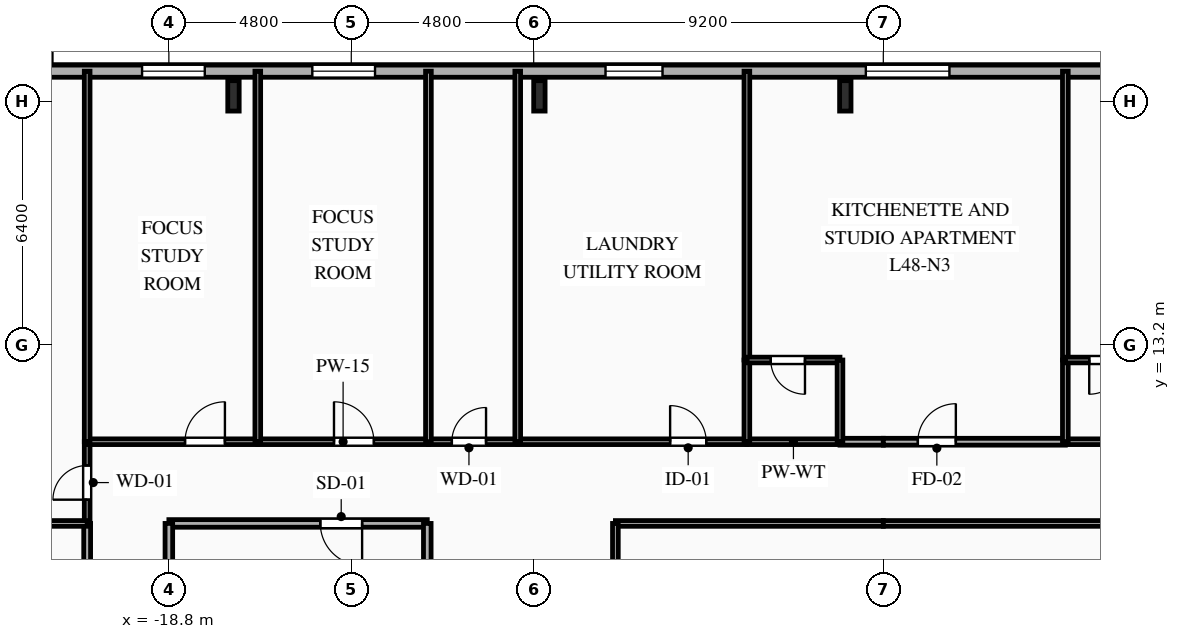
"""IFC4 building model, lengths in metres.
Left out: names, types, materials, properties, quantities, classifications, styles, units other than length and angle.
Written with IfcOpenShell. Run it as: python <this file> out.ifc"""

import sys

from ifc_helpers import new_model, si_unit, direction, frame, frame_2d, origin, origin_2d, place, context, subcontext, project, spatial, rectangle, i_section, extrude, element, fill, save


model = new_model("IFC4")
c1 = context("Model", 3, precision=1e-05, world=origin(), true_north=direction((0.0, 1.0)))
c2 = subcontext(c1, "Body", "Model", "MODEL_VIEW")
j1 = project(units=[si_unit("LENGTHUNIT", "METRE"), si_unit("PLANEANGLEUNIT", "RADIAN")], contexts=[c1])
p1 = place(None, origin())
s1 = spatial("IfcSite", under=j1, at=p1, CompositionType="ELEMENT")
p2 = place(p1, origin())
s2 = spatial("IfcBuilding", under=s1, at=p2, CompositionType="ELEMENT")
p3 = place(p2, frame((0.0, 0.0, 171.2)))
s3 = spatial("IfcBuildingStorey", under=s2, at=p3, CompositionType="ELEMENT", Elevation=171.2)
for number, where, z_axis, x_axis in (
    (1, (-1.0, 19.75, 0.0), (0.0, 0.0, 1.0), (1.0, 0.0, 0.0)),
    (2, (-9.05, 19.75, 0.0), (0.0, 0.0, 1.0), (1.0, 0.0, 0.0)),
    (3, (-17.1, 19.75, 0.0), (0.0, 0.0, 1.0), (1.0, 0.0, 0.0)),
):
    element("IfcColumn", number, at=place(p3, frame(where, z_axis=z_axis, x_axis=x_axis)), inside=s3, PredefinedType="COLUMN", context=c2, shape_type="SweptSolid", body=[
        extrude(i_section(OverallWidth=0.3, OverallDepth=0.8, WebThickness=0.018, FlangeThickness=0.033, FilletRadius=0.03, at=origin_2d()), origin(), (0.0, 0.0, 1.0), 3.35),
    ])
p4 = place(p3, frame((-25.8, 20.4, 0.0), z_axis=(0.0, 0.0, 1.0), x_axis=(1.0, 0.0, 0.0)))
e4 = element("IfcWall", 4, at=p4, inside=s3, PredefinedType="SOLIDWALL", context=c2, shape_type="SweptSolid", body=[
    extrude(rectangle(XDim=49.6, YDim=0.32, at=frame_2d((24.8, 0.0))), origin(), (0.0, 0.0, 1.0), 3.0),
])
p5 = place(p4, frame((2.135, 0.0, 0.85)))
e5 = element("IfcOpeningElement", 5, at=p5, cuts=e4, PredefinedType="OPENING", context=c2, shape_type="SweptSolid", body=[
    extrude(rectangle(XDim=1.65, YDim=1.85, at=frame_2d((0.825, 0.925))), frame((0.0, 0.17, 0.0), z_axis=(0.0, -1.0, 0.0), x_axis=(1.0, 0.0, 0.0)), (0.0, 0.0, 1.0), 0.34),
])
p6 = place(p4, frame((6.295, 0.0, 0.85)))
e6 = element("IfcOpeningElement", 6, at=p6, cuts=e4, PredefinedType="OPENING", context=c2, shape_type="SweptSolid", body=[
    extrude(rectangle(XDim=1.65, YDim=1.85, at=frame_2d((0.825, 0.925))), frame((0.0, 0.17, 0.0), z_axis=(0.0, -1.0, 0.0), x_axis=(1.0, 0.0, 0.0)), (0.0, 0.0, 1.0), 0.34),
])
p7 = place(p4, frame((10.775, 0.0, 0.85)))
e7 = element("IfcOpeningElement", 7, at=p7, cuts=e4, PredefinedType="OPENING", context=c2, shape_type="SweptSolid", body=[
    extrude(rectangle(XDim=1.65, YDim=1.85, at=frame_2d((0.825, 0.925))), frame((0.0, 0.17, 0.0), z_axis=(0.0, -1.0, 0.0), x_axis=(1.0, 0.0, 0.0)), (0.0, 0.0, 1.0), 0.34),
])
p8 = place(p4, frame((18.49, 0.0, 0.85)))
e8 = element("IfcOpeningElement", 8, at=p8, cuts=e4, PredefinedType="OPENING", context=c2, shape_type="SweptSolid", body=[
    extrude(rectangle(XDim=1.5, YDim=1.85, at=frame_2d((0.75, 0.925))), frame((0.0, 0.17, 0.0), z_axis=(0.0, -1.0, 0.0), x_axis=(1.0, 0.0, 0.0)), (0.0, 0.0, 1.0), 0.34),
])
p9 = place(p4, frame((25.34, 0.0, 0.85)))
e9 = element("IfcOpeningElement", 9, at=p9, cuts=e4, PredefinedType="OPENING", context=c2, shape_type="SweptSolid", body=[
    extrude(rectangle(XDim=2.2, YDim=1.85, at=frame_2d((1.1, 0.925))), frame((0.0, 0.17, 0.0), z_axis=(0.0, -1.0, 0.0), x_axis=(1.0, 0.0, 0.0)), (0.0, 0.0, 1.0), 0.34),
])
p10 = place(p4, frame((33.74, 0.0, 0.85)))
e10 = element("IfcOpeningElement", 10, at=p10, cuts=e4, PredefinedType="OPENING", context=c2, shape_type="SweptSolid", body=[
    extrude(rectangle(XDim=2.2, YDim=1.85, at=frame_2d((1.1, 0.925))), frame((0.0, 0.17, 0.0), z_axis=(0.0, -1.0, 0.0), x_axis=(1.0, 0.0, 0.0)), (0.0, 0.0, 1.0), 0.34),
])
p11 = place(p4, frame((42.095, 0.0, 0.85)))
e11 = element("IfcOpeningElement", 11, at=p11, cuts=e4, PredefinedType="OPENING", context=c2, shape_type="SweptSolid", body=[
    extrude(rectangle(XDim=1.65, YDim=1.85, at=frame_2d((0.825, 0.925))), frame((0.0, 0.17, 0.0), z_axis=(0.0, -1.0, 0.0), x_axis=(1.0, 0.0, 0.0)), (0.0, 0.0, 1.0), 0.34),
])
p12 = place(p4, frame((47.45, 0.0, 0.85)))
e12 = element("IfcOpeningElement", 12, at=p12, cuts=e4, PredefinedType="OPENING", context=c2, shape_type="SweptSolid", body=[
    extrude(rectangle(XDim=1.1, YDim=1.85, at=frame_2d((0.55, 0.925))), frame((0.0, 0.17, 0.0), z_axis=(0.0, -1.0, 0.0), x_axis=(1.0, 0.0, 0.0)), (0.0, 0.0, 1.0), 0.34),
])
p13 = place(p3, frame((-12.0, 8.5, 0.0), z_axis=(0.0, 0.0, 1.0), x_axis=(-1.0, 0.0, 0.0)))
e13 = element("IfcWall", 13, at=p13, inside=s3, PredefinedType="PARTITIONING", context=c2, shape_type="SweptSolid", body=[
    extrude(rectangle(XDim=6.8, YDim=0.2, at=frame_2d((3.4, 0.0))), origin(), (0.0, 0.0, 1.0), 3.0),
])
p14 = place(p13, frame((1.715, 0.0, 0.0)))
e14 = element("IfcOpeningElement", 14, at=p14, cuts=e13, PredefinedType="OPENING", context=c2, shape_type="SweptSolid", body=[
    extrude(rectangle(XDim=1.1, YDim=2.15, at=frame_2d((0.55, 1.075))), frame((0.0, 0.11, 0.0), z_axis=(0.0, -1.0, 0.0), x_axis=(1.0, 0.0, 0.0)), (0.0, 0.0, 1.0), 0.22),
])
p15 = place(p3, frame((-18.8, 8.5, 0.0), z_axis=(0.0, 0.0, 1.0), x_axis=(0.0, -1.0, 0.0)))
e15 = element("IfcWall", 15, at=p15, inside=s3, PredefinedType="PARTITIONING", context=c2, shape_type="SweptSolid", body=[
    extrude(rectangle(XDim=2.9, YDim=0.2, at=frame_2d((1.45, 0.0))), origin(), (0.0, 0.0, 1.0), 2.485),
])
p16 = place(p3, frame((-12.0, 5.6, 0.0), z_axis=(0.0, 0.0, 1.0), x_axis=(0.0, 1.0, 0.0)))
e16 = element("IfcWall", 16, at=p16, inside=s3, PredefinedType="PARTITIONING", context=c2, shape_type="SweptSolid", body=[
    extrude(rectangle(XDim=2.9, YDim=0.2, at=frame_2d((1.45, 0.0))), origin(), (0.0, 0.0, 1.0), 3.0),
])
p17 = place(p3, frame((-20.95, 8.5, 0.0), z_axis=(0.0, 0.0, 1.0), x_axis=(0.0, 1.0, 0.0)))
e17 = element("IfcWall", 17, at=p17, inside=s3, PredefinedType="PARTITIONING", context=c2, shape_type="SweptSolid", body=[
    extrude(rectangle(XDim=2.15, YDim=0.15, at=frame_2d((1.075, 0.0))), origin(), (0.0, 0.0, 1.0), 3.0),
])
p18 = place(p17, frame((0.625, 0.0, 0.0)))
e18 = element("IfcOpeningElement", 18, at=p18, cuts=e17, PredefinedType="OPENING", context=c2, shape_type="SweptSolid", body=[
    extrude(rectangle(XDim=0.9, YDim=2.1, at=frame_2d((0.45, 1.05))), frame((0.0, 0.085, 0.0), z_axis=(0.0, -1.0, 0.0), x_axis=(1.0, 0.0, 0.0)), (0.0, 0.0, 1.0), 0.17),
])
p19 = place(p3, frame((-20.95, 10.65, 0.0), z_axis=(0.0, 0.0, 1.0), x_axis=(1.0, 0.0, 0.0)))
e19 = element("IfcWall", 19, at=p19, inside=s3, PredefinedType="PARTITIONING", context=c2, shape_type="SweptSolid", body=[
    extrude(rectangle(XDim=4.49, YDim=0.15, at=frame_2d((2.245, 0.0))), origin(), (0.0, 0.0, 1.0), 3.0),
])
p20 = place(p19, frame((2.575, 0.0, 0.0)))
e20 = element("IfcOpeningElement", 20, at=p20, cuts=e19, PredefinedType="OPENING", context=c2, shape_type="SweptSolid", body=[
    extrude(rectangle(XDim=1.05, YDim=2.15, at=frame_2d((0.525, 1.075))), frame((0.0, 0.085, 0.0), z_axis=(0.0, -1.0, 0.0), x_axis=(1.0, 0.0, 0.0)), (0.0, 0.0, 1.0), 0.17),
])
p21 = place(p3, frame((-16.46, 10.65, 0.0), z_axis=(0.0, 0.0, 1.0), x_axis=(1.0, 0.0, 0.0)))
e21 = element("IfcWall", 21, at=p21, inside=s3, PredefinedType="PARTITIONING", context=c2, shape_type="SweptSolid", body=[
    extrude(rectangle(XDim=4.49, YDim=0.15, at=frame_2d((2.245, 0.0))), origin(), (0.0, 0.0, 1.0), 3.0),
])
p22 = place(p21, frame((2.005, 0.0, 0.0)))
e22 = element("IfcOpeningElement", 22, at=p22, cuts=e21, PredefinedType="OPENING", context=c2, shape_type="SweptSolid", body=[
    extrude(rectangle(XDim=1.05, YDim=2.15, at=frame_2d((0.525, 1.075))), frame((0.0, 0.085, 0.0), z_axis=(0.0, -1.0, 0.0), x_axis=(1.0, 0.0, 0.0)), (0.0, 0.0, 1.0), 0.17),
])
p23 = place(p3, frame((-11.97, 10.65, 0.0), z_axis=(0.0, 0.0, 1.0), x_axis=(1.0, 0.0, 0.0)))
e23 = element("IfcWall", 23, at=p23, inside=s3, PredefinedType="PLUMBINGWALL", context=c2, shape_type="SweptSolid", body=[
    extrude(rectangle(XDim=2.35, YDim=0.15, at=frame_2d((1.175, 0.0))), origin(), (0.0, 0.0, 1.0), 3.0),
])
p24 = place(p23, frame((0.616, 0.0, 0.0)))
e24 = element("IfcOpeningElement", 24, at=p24, cuts=e23, PredefinedType="OPENING", context=c2, shape_type="SweptSolid", body=[
    extrude(rectangle(XDim=0.9, YDim=2.1, at=frame_2d((0.45, 1.05))), frame((0.0, 0.085, 0.0), z_axis=(0.0, -1.0, 0.0), x_axis=(1.0, 0.0, 0.0)), (0.0, 0.0, 1.0), 0.17),
])
p25 = place(p3, frame((-9.62, 10.65, 0.0), z_axis=(0.0, 0.0, 1.0), x_axis=(1.0, 0.0, 0.0)))
e25 = element("IfcWall", 25, at=p25, inside=s3, PredefinedType="PARTITIONING", context=c2, shape_type="SweptSolid", body=[
    extrude(rectangle(XDim=6.03, YDim=0.15, at=frame_2d((3.015, 0.0))), origin(), (0.0, 0.0, 1.0), 3.0),
])
p26 = place(p25, frame((4.01, 0.0, 0.0)))
e26 = element("IfcOpeningElement", 26, at=p26, cuts=e25, PredefinedType="OPENING", context=c2, shape_type="SweptSolid", body=[
    extrude(rectangle(XDim=0.95, YDim=2.1, at=frame_2d((0.475, 1.05))), frame((0.0, 0.085, 0.0), z_axis=(0.0, -1.0, 0.0), x_axis=(1.0, 0.0, 0.0)), (0.0, 0.0, 1.0), 0.17),
])
p27 = place(p3, frame((-1.14, 10.65, 0.0), z_axis=(0.0, 0.0, 1.0), x_axis=(1.0, 0.0, 0.0)))
e27 = element("IfcWall", 27, at=p27, inside=s3, PredefinedType="PARTITIONING", context=c2, shape_type="SweptSolid", body=[
    extrude(rectangle(XDim=1.14, YDim=0.18, at=frame_2d((0.57, 0.0))), origin(), (0.0, 0.0, 1.0), 3.0),
])
p28 = place(p3, frame((-3.59, 10.65, 0.0), z_axis=(0.0, 0.0, 1.0), x_axis=(1.0, 0.0, 0.0)))
e28 = element("IfcWall", 28, at=p28, inside=s3, PredefinedType="PLUMBINGWALL", context=c2, shape_type="SweptSolid", body=[
    extrude(rectangle(XDim=2.45, YDim=0.15, at=frame_2d((1.225, 0.0))), origin(), (0.0, 0.0, 1.0), 3.0),
])
p29 = place(p3, frame((0.0, 8.5, 0.0), z_axis=(0.0, 0.0, 1.0), x_axis=(-1.0, 0.0, 0.0)))
e29 = element("IfcWall", 29, at=p29, inside=s3, PredefinedType="PARTITIONING", context=c2, shape_type="SweptSolid", body=[
    extrude(rectangle(XDim=7.05, YDim=0.15, at=frame_2d((3.525, 0.0))), origin(), (0.0, 0.0, 1.0), 3.0),
])
p30 = place(p3, frame((0.0, 10.65, 0.0), z_axis=(0.0, 0.0, 1.0), x_axis=(1.0, 0.0, 0.0)))
e30 = element("IfcWall", 30, at=p30, inside=s3, PredefinedType="PARTITIONING", context=c2, shape_type="SweptSolid", body=[
    extrude(rectangle(XDim=4.79, YDim=0.18, at=frame_2d((2.395, 0.0))), origin(), (0.0, 0.0, 1.0), 3.0),
])
p31 = place(p30, frame((0.909, 0.0, 0.0)))
e31 = element("IfcOpeningElement", 31, at=p31, cuts=e30, PredefinedType="OPENING", context=c2, shape_type="SweptSolid", body=[
    extrude(rectangle(XDim=1.0, YDim=2.15, at=frame_2d((0.5, 1.075))), frame((0.0, 0.1, 0.0), z_axis=(0.0, -1.0, 0.0), x_axis=(1.0, 0.0, 0.0)), (0.0, 0.0, 1.0), 0.2),
])
p32 = place(p3, frame((4.79, 10.65, 0.0), z_axis=(0.0, 0.0, 1.0), x_axis=(1.0, 0.0, 0.0)))
e32 = element("IfcWall", 32, at=p32, inside=s3, PredefinedType="PLUMBINGWALL", context=c2, shape_type="SweptSolid", body=[
    extrude(rectangle(XDim=2.45, YDim=0.15, at=frame_2d((1.225, 0.0))), origin(), (0.0, 0.0, 1.0), 3.0),
])
p33 = place(p3, frame((7.05, 8.5, 0.0), z_axis=(0.0, 0.0, 1.0), x_axis=(-1.0, 0.0, 0.0)))
e33 = element("IfcWall", 33, at=p33, inside=s3, PredefinedType="PARTITIONING", context=c2, shape_type="SweptSolid", body=[
    extrude(rectangle(XDim=7.05, YDim=0.15, at=frame_2d((3.525, 0.0))), origin(), (0.0, 0.0, 1.0), 3.0),
])
p34 = place(p3, frame((-20.95, -5.6, 0.0), z_axis=(0.0, 0.0, 1.0), x_axis=(0.0, 1.0, 0.0)))
e34 = element("IfcWall", 34, at=p34, inside=s3, PredefinedType="PARTITIONING", context=c2, shape_type="SweptSolid", body=[
    extrude(rectangle(XDim=14.1, YDim=0.18, at=frame_2d((7.05, 0.0))), origin(), (0.0, 0.0, 1.0), 3.0),
])
p35 = place(p34, frame((5.058, 0.0, 0.0)))
e35 = element("IfcOpeningElement", 35, at=p35, cuts=e34, PredefinedType="OPENING", context=c2, shape_type="SweptSolid", body=[
    extrude(rectangle(XDim=1.0, YDim=2.15, at=frame_2d((0.5, 1.075))), frame((0.0, 0.1, 0.0), z_axis=(0.0, -1.0, 0.0), x_axis=(1.0, 0.0, 0.0)), (0.0, 0.0, 1.0), 0.2),
])
p36 = place(p3, frame((-7.05, 8.5, 0.0), z_axis=(0.0, 0.0, 1.0), x_axis=(0.0, -1.0, 0.0)))
e36 = element("IfcWall", 36, at=p36, inside=s3, PredefinedType="PARTITIONING", context=c2, shape_type="SweptSolid", body=[
    extrude(rectangle(XDim=9.3, YDim=0.15, at=frame_2d((4.65, 0.0))), origin(), (0.0, 0.0, 1.0), 3.0),
])
p37 = place(p3, frame((-23.6, 8.5, 0.0), z_axis=(0.0, 0.0, 1.0), x_axis=(1.0, 0.0, 0.0)))
e37 = element("IfcWall", 37, at=p37, inside=s3, PredefinedType="PARTITIONING", context=c2, shape_type="SweptSolid", body=[
    extrude(rectangle(XDim=2.65, YDim=0.15, at=frame_2d((1.325, 0.0))), origin(), (0.0, 0.0, 1.0), 3.0),
])
p38 = place(p37, frame((0.635, 0.0, 0.0)))
e38 = element("IfcOpeningElement", 38, at=p38, cuts=e37, PredefinedType="OPENING", context=c2, shape_type="SweptSolid", body=[
    extrude(rectangle(XDim=1.05, YDim=2.15, at=frame_2d((0.525, 1.075))), frame((0.0, 0.085, 0.0), z_axis=(0.0, -1.0, 0.0), x_axis=(1.0, 0.0, 0.0)), (0.0, 0.0, 1.0), 0.17),
])
for number, where, z_axis, x_axis in (
    (39, (-20.95, 20.4, 0.0), (0.0, 0.0, 1.0), (0.0, -1.0, 0.0)),
    (40, (-16.46, 20.4, 0.0), (0.0, 0.0, 1.0), (0.0, -1.0, 0.0)),
):
    element("IfcWall", number, at=place(p3, frame(where, z_axis=z_axis, x_axis=x_axis)), inside=s3, PredefinedType="PARTITIONING", context=c2, shape_type="SweptSolid", body=[
        extrude(rectangle(XDim=9.75, YDim=0.15, at=frame_2d((4.875, 0.0))), origin(), (0.0, 0.0, 1.0), 3.0),
    ])
for number, where, z_axis, x_axis in (
    (41, (-11.97, 20.4, 0.0), (0.0, 0.0, 1.0), (0.0, -1.0, 0.0)),
    (42, (-9.62, 20.4, 0.0), (0.0, 0.0, 1.0), (0.0, -1.0, 0.0)),
):
    element("IfcWall", number, at=place(p3, frame(where, z_axis=z_axis, x_axis=x_axis)), inside=s3, PredefinedType="PLUMBINGWALL", context=c2, shape_type="SweptSolid", body=[
        extrude(rectangle(XDim=9.75, YDim=0.15, at=frame_2d((4.875, 0.0))), origin(), (0.0, 0.0, 1.0), 3.0),
    ])
p39 = place(p3, frame((-3.59, 20.4, 0.0), z_axis=(0.0, 0.0, 1.0), x_axis=(0.0, -1.0, 0.0)))
e43 = element("IfcWall", 43, at=p39, inside=s3, PredefinedType="PARTITIONING", context=c2, shape_type="SweptSolid", body=[
    extrude(rectangle(XDim=7.6, YDim=0.15, at=frame_2d((3.8, 0.0))), origin(), (0.0, 0.0, 1.0), 3.0),
])
p40 = place(p3, frame((-3.59, 12.8, 0.0), z_axis=(0.0, 0.0, 1.0), x_axis=(0.0, -1.0, 0.0)))
e44 = element("IfcWall", 44, at=p40, inside=s3, PredefinedType="PLUMBINGWALL", context=c2, shape_type="SweptSolid", body=[
    extrude(rectangle(XDim=2.15, YDim=0.15, at=frame_2d((1.075, 0.0))), origin(), (0.0, 0.0, 1.0), 3.0),
])
p41 = place(p3, frame((-1.14, 12.8, 0.0), z_axis=(0.0, 0.0, 1.0), x_axis=(-1.0, 0.0, 0.0)))
e45 = element("IfcWall", 45, at=p41, inside=s3, PredefinedType="PLUMBINGWALL", context=c2, shape_type="SweptSolid", body=[
    extrude(rectangle(XDim=2.45, YDim=0.15, at=frame_2d((1.225, 0.0))), origin(), (0.0, 0.0, 1.0), 3.0),
])
p42 = place(p41, frame((0.921, 0.0, 0.0)))
e46 = element("IfcOpeningElement", 46, at=p42, cuts=e45, PredefinedType="OPENING", context=c2, shape_type="SweptSolid", body=[
    extrude(rectangle(XDim=0.9, YDim=2.1, at=frame_2d((0.45, 1.05))), frame((0.0, 0.085, 0.0), z_axis=(0.0, -1.0, 0.0), x_axis=(1.0, 0.0, 0.0)), (0.0, 0.0, 1.0), 0.17),
])
p43 = place(p3, frame((-1.14, 10.65, 0.0), z_axis=(0.0, 0.0, 1.0), x_axis=(0.0, 1.0, 0.0)))
e47 = element("IfcWall", 47, at=p43, inside=s3, PredefinedType="PLUMBINGWALL", context=c2, shape_type="SweptSolid", body=[
    extrude(rectangle(XDim=2.15, YDim=0.15, at=frame_2d((1.075, 0.0))), origin(), (0.0, 0.0, 1.0), 3.0),
])
p44 = place(p3, frame((4.79, 20.4, 0.0), z_axis=(0.0, 0.0, 1.0), x_axis=(0.0, -1.0, 0.0)))
e48 = element("IfcWall", 48, at=p44, inside=s3, PredefinedType="PARTITIONING", context=c2, shape_type="SweptSolid", body=[
    extrude(rectangle(XDim=7.6, YDim=0.15, at=frame_2d((3.8, 0.0))), origin(), (0.0, 0.0, 1.0), 3.0),
])
p45 = place(p3, frame((4.79, 12.8, 0.0), z_axis=(0.0, 0.0, 1.0), x_axis=(0.0, -1.0, 0.0)))
e49 = element("IfcWall", 49, at=p45, inside=s3, PredefinedType="PLUMBINGWALL", context=c2, shape_type="SweptSolid", body=[
    extrude(rectangle(XDim=2.15, YDim=0.15, at=frame_2d((1.075, 0.0))), origin(), (0.0, 0.0, 1.0), 3.0),
])
p46 = place(p3, frame((7.24, 12.8, 0.0), z_axis=(0.0, 0.0, 1.0), x_axis=(-1.0, 0.0, 0.0)))
e50 = element("IfcWall", 50, at=p46, inside=s3, PredefinedType="PLUMBINGWALL", context=c2, shape_type="SweptSolid", body=[
    extrude(rectangle(XDim=2.45, YDim=0.15, at=frame_2d((1.225, 0.0))), origin(), (0.0, 0.0, 1.0), 3.0),
])
p47 = place(p46, frame((0.921, 0.0, 0.0)))
e51 = element("IfcOpeningElement", 51, at=p47, cuts=e50, PredefinedType="OPENING", context=c2, shape_type="SweptSolid", body=[
    extrude(rectangle(XDim=0.9, YDim=2.1, at=frame_2d((0.45, 1.05))), frame((0.0, 0.085, 0.0), z_axis=(0.0, -1.0, 0.0), x_axis=(1.0, 0.0, 0.0)), (0.0, 0.0, 1.0), 0.17),
])
p48 = place(p6, origin())
e52 = element("IfcWindow", 52, at=p48, inside=s3, PartitioningType="SINGLE_PANEL", PredefinedType="WINDOW", context=c2, shape_type="SweptSolid", body=[
    extrude(rectangle(XDim=1.65, YDim=1.85, at=frame_2d((0.825, 0.925))), frame((0.0, 0.03, 0.0), z_axis=(0.0, -1.0, 0.0), x_axis=(1.0, 0.0, 0.0)), (0.0, 0.0, 1.0), 0.06),
])
fill(e6, e52)
p49 = place(p7, origin())
e53 = element("IfcWindow", 53, at=p49, inside=s3, PartitioningType="SINGLE_PANEL", PredefinedType="WINDOW", context=c2, shape_type="SweptSolid", body=[
    extrude(rectangle(XDim=1.65, YDim=1.85, at=frame_2d((0.825, 0.925))), frame((0.0, 0.03, 0.0), z_axis=(0.0, -1.0, 0.0), x_axis=(1.0, 0.0, 0.0)), (0.0, 0.0, 1.0), 0.06),
])
fill(e7, e53)
p50 = place(p8, origin())
e54 = element("IfcWindow", 54, at=p50, inside=s3, PartitioningType="SINGLE_PANEL", PredefinedType="WINDOW", context=c2, shape_type="SweptSolid", body=[
    extrude(rectangle(XDim=1.5, YDim=1.85, at=frame_2d((0.75, 0.925))), frame((0.0, 0.03, 0.0), z_axis=(0.0, -1.0, 0.0), x_axis=(1.0, 0.0, 0.0)), (0.0, 0.0, 1.0), 0.06),
])
fill(e8, e54)
p51 = place(p9, origin())
e55 = element("IfcWindow", 55, at=p51, inside=s3, PartitioningType="SINGLE_PANEL", PredefinedType="WINDOW", context=c2, shape_type="SweptSolid", body=[
    extrude(rectangle(XDim=2.2, YDim=1.85, at=frame_2d((1.1, 0.925))), frame((0.0, 0.03, 0.0), z_axis=(0.0, -1.0, 0.0), x_axis=(1.0, 0.0, 0.0)), (0.0, 0.0, 1.0), 0.06),
])
fill(e9, e55)
p52 = place(p14, origin())
e56 = element("IfcDoor", 56, at=p52, inside=s3, OperationType="SINGLE_SWING_LEFT", PredefinedType="DOOR", context=c2, shape_type="SweptSolid", body=[
    extrude(rectangle(XDim=1.1, YDim=2.15, at=frame_2d((0.55, 1.075))), frame((0.0, 0.025, 0.0), z_axis=(0.0, -1.0, 0.0), x_axis=(1.0, 0.0, 0.0)), (0.0, 0.0, 1.0), 0.05),
])
fill(e14, e56)
p53 = place(p18, origin())
e57 = element("IfcDoor", 57, at=p53, inside=s3, OperationType="SINGLE_SWING_LEFT", PredefinedType="DOOR", context=c2, shape_type="SweptSolid", body=[
    extrude(rectangle(XDim=0.9, YDim=2.1, at=frame_2d((0.45, 1.05))), frame((0.0, 0.025, 0.0), z_axis=(0.0, -1.0, 0.0), x_axis=(1.0, 0.0, 0.0)), (0.0, 0.0, 1.0), 0.05),
])
fill(e18, e57)
p54 = place(p20, origin())
e58 = element("IfcDoor", 58, at=p54, inside=s3, OperationType="SINGLE_SWING_RIGHT", PredefinedType="DOOR", context=c2, shape_type="SweptSolid", body=[
    extrude(rectangle(XDim=1.05, YDim=2.15, at=frame_2d((0.525, 1.075))), frame((0.0, 0.025, 0.0), z_axis=(0.0, -1.0, 0.0), x_axis=(1.0, 0.0, 0.0)), (0.0, 0.0, 1.0), 0.05),
])
fill(e20, e58)
p55 = place(p22, origin())
e59 = element("IfcDoor", 59, at=p55, inside=s3, OperationType="SINGLE_SWING_LEFT", PredefinedType="DOOR", context=c2, shape_type="SweptSolid", body=[
    extrude(rectangle(XDim=1.05, YDim=2.15, at=frame_2d((0.525, 1.075))), frame((0.0, 0.025, 0.0), z_axis=(0.0, -1.0, 0.0), x_axis=(1.0, 0.0, 0.0)), (0.0, 0.0, 1.0), 0.05),
])
fill(e22, e59)
p56 = place(p24, origin())
e60 = element("IfcDoor", 60, at=p56, inside=s3, OperationType="SINGLE_SWING_RIGHT", PredefinedType="DOOR", context=c2, shape_type="SweptSolid", body=[
    extrude(rectangle(XDim=0.9, YDim=2.1, at=frame_2d((0.45, 1.05))), frame((0.0, 0.025, 0.0), z_axis=(0.0, -1.0, 0.0), x_axis=(1.0, 0.0, 0.0)), (0.0, 0.0, 1.0), 0.05),
])
fill(e24, e60)
p57 = place(p26, origin())
e61 = element("IfcDoor", 61, at=p57, inside=s3, OperationType="SINGLE_SWING_LEFT", PredefinedType="DOOR", context=c2, shape_type="SweptSolid", body=[
    extrude(rectangle(XDim=0.95, YDim=2.1, at=frame_2d((0.475, 1.05))), frame((0.0, 0.025, 0.0), z_axis=(0.0, -1.0, 0.0), x_axis=(1.0, 0.0, 0.0)), (0.0, 0.0, 1.0), 0.05),
])
fill(e26, e61)
p58 = place(p31, origin())
e62 = element("IfcDoor", 62, at=p58, inside=s3, OperationType="SINGLE_SWING_RIGHT", PredefinedType="DOOR", context=c2, shape_type="SweptSolid", body=[
    extrude(rectangle(XDim=1.0, YDim=2.15, at=frame_2d((0.5, 1.075))), frame((0.0, 0.025, 0.0), z_axis=(0.0, -1.0, 0.0), x_axis=(1.0, 0.0, 0.0)), (0.0, 0.0, 1.0), 0.05),
])
fill(e31, e62)
p59 = place(p42, origin())
e63 = element("IfcDoor", 63, at=p59, inside=s3, OperationType="SINGLE_SWING_LEFT", PredefinedType="DOOR", context=c2, shape_type="SweptSolid", body=[
    extrude(rectangle(XDim=0.9, YDim=2.1, at=frame_2d((0.45, 1.05))), frame((0.0, 0.025, 0.0), z_axis=(0.0, -1.0, 0.0), x_axis=(1.0, 0.0, 0.0)), (0.0, 0.0, 1.0), 0.05),
])
fill(e46, e63)
p60 = place(p47, origin())
e64 = element("IfcDoor", 64, at=p60, inside=s3, OperationType="SINGLE_SWING_RIGHT", PredefinedType="DOOR", context=c2, shape_type="SweptSolid", body=[
    extrude(rectangle(XDim=0.9, YDim=2.1, at=frame_2d((0.45, 1.05))), frame((0.0, 0.025, 0.0), z_axis=(0.0, -1.0, 0.0), x_axis=(1.0, 0.0, 0.0)), (0.0, 0.0, 1.0), 0.05),
])
fill(e51, e64)
save(model, sys.argv[1])
